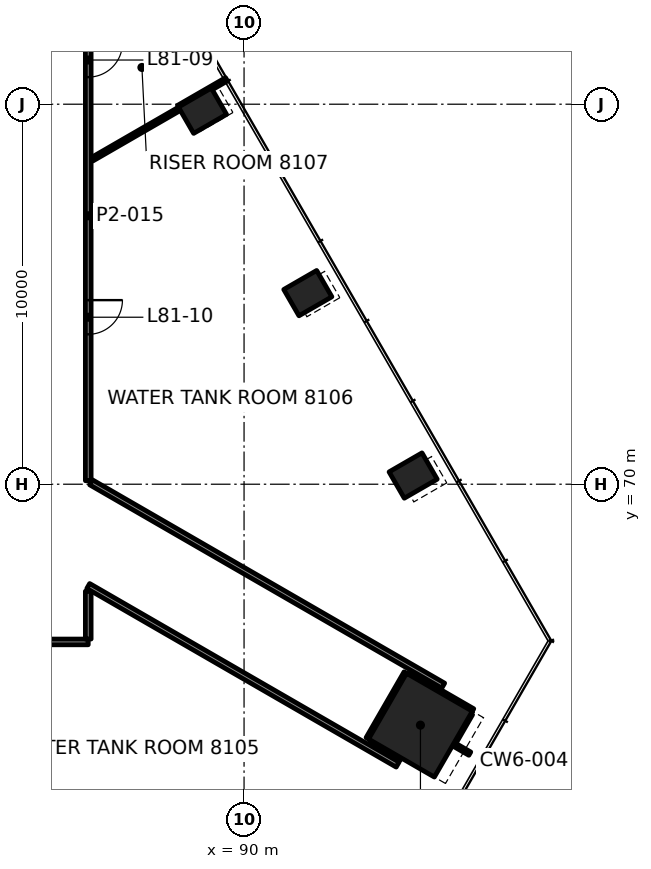
"""IFC4 building model, lengths in metres.
Left out: names, types, materials, properties, quantities, classifications, styles, units other than length and angle.
Written with IfcOpenShell. Run it as: python <this file> out.ifc"""

import sys

from ifc_helpers import new_model, si_unit, direction, frame, frame_2d, origin, origin_2d, place, context, subcontext, project, spatial, rectangle, hollow_rectangle, extrude, element, fill, save


model = new_model("IFC4")
c1 = context("Model", 3, precision=1e-05, world=origin(), true_north=direction((0.0, 1.0)))
c2 = subcontext(c1, "Body", "Model", "MODEL_VIEW")
j1 = project(units=[si_unit("LENGTHUNIT", "METRE"), si_unit("PLANEANGLEUNIT", "RADIAN")], contexts=[c1])
p1 = place(None, origin())
s1 = spatial("IfcSite", under=j1, at=p1, CompositionType="ELEMENT")
p2 = place(p1, origin())
s2 = spatial("IfcBuilding", under=s1, at=p2, CompositionType="ELEMENT")
p3 = place(p2, frame((0.0, 0.0, 331.6)))
s3 = spatial("IfcBuildingStorey", under=s2, at=p3, CompositionType="ELEMENT", Elevation=331.6)
p4 = place(p3, frame((94.641, 63.66, 0.0), z_axis=(0.0, 0.0, 1.0), x_axis=(0.5, 0.866025403784, 0.0)))
e1 = element("IfcColumn", 1, at=p4, inside=s3, PredefinedType="COLUMN", context=c2, shape_type="SweptSolid", body=[
    extrude(rectangle(XDim=2.0, YDim=2.0, at=origin_2d()), origin(), (0.0, 0.0, 1.0), 4.0),
])
for number, where, z_axis, x_axis in (
    (2, (94.449, 70.228, -0.0), (0.0, 0.0, 1.0), (-0.5, 0.866, 0.0)),
    (3, (91.678, 75.028, -0.0), (0.0, 0.0, 1.0), (-0.5, 0.866, 0.0)),
    (4, (88.906, 79.829, -0.0), (0.0, 0.0, 1.0), (-0.5, 0.866, 0.0)),
):
    element("IfcColumn", number, at=place(p3, frame(where, z_axis=z_axis, x_axis=x_axis)), inside=s3, PredefinedType="COLUMN", context=c2, shape_type="SweptSolid", body=[
        extrude(hollow_rectangle(XDim=0.8, YDim=1.0, WallThickness=0.05, at=origin_2d()), origin(), (0.0, 0.0, 1.0), 4.0),
    ])
p5 = place(p3, frame((85.899, 65.85, 0.0), z_axis=(0.0, 0.0, 1.0), x_axis=(-1.0, 0.0, 0.0)))
e5 = element("IfcWall", 5, at=p5, inside=s3, PredefinedType="PARTITIONING", context=c2, shape_type="SweptSolid", body=[
    extrude(rectangle(XDim=21.799, YDim=0.15, at=frame_2d((10.899, 0.0))), origin(), (0.0, 0.0, 1.0), 3.1),
])
p6 = place(p5, frame((1.464, 0.0, 0.0)))
e6 = element("IfcOpeningElement", 6, at=p6, cuts=e5, PredefinedType="OPENING", context=c2, shape_type="SweptSolid", body=[
    extrude(rectangle(XDim=0.9, YDim=2.1, at=frame_2d((0.45, 1.05))), frame((0.0, 0.085, 0.0), z_axis=(0.0, -1.0, 0.0), x_axis=(1.0, 0.0, 0.0)), (0.0, 0.0, 1.0), 0.17),
])
p7 = place(p5, frame((10.449, 0.0, 0.0)))
e7 = element("IfcOpeningElement", 7, at=p7, cuts=e5, PredefinedType="OPENING", context=c2, shape_type="SweptSolid", body=[
    extrude(rectangle(XDim=0.9, YDim=2.1, at=frame_2d((0.45, 1.05))), frame((0.0, 0.085, 0.0), z_axis=(0.0, -1.0, 0.0), x_axis=(1.0, 0.0, 0.0)), (0.0, 0.0, 1.0), 0.17),
])
p8 = place(p5, frame((19.435, 0.0, 0.0)))
e8 = element("IfcOpeningElement", 8, at=p8, cuts=e5, PredefinedType="OPENING", context=c2, shape_type="SweptSolid", body=[
    extrude(rectangle(XDim=0.9, YDim=2.1, at=frame_2d((0.45, 1.05))), frame((0.0, 0.085, 0.0), z_axis=(0.0, -1.0, 0.0), x_axis=(1.0, 0.0, 0.0)), (0.0, 0.0, 1.0), 0.17),
])
p9 = place(p3, frame((86.001, 78.551, 0.0), z_axis=(0.0, 0.0, 1.0), x_axis=(0.86602171968, 0.500006381002, 0.0)))
e9 = element("IfcWall", 9, at=p9, inside=s3, PredefinedType="PARTITIONING", context=c2, shape_type="SweptSolid", body=[
    extrude(rectangle(XDim=2.655, YDim=0.1, at=frame_2d((1.327, 0.0))), origin(), (0.0, 0.0, 1.0), 3.1),
])
p10 = place(p3, frame((88.273, 79.925, 0.0), z_axis=(0.0, 0.0, 1.0), x_axis=(0.866032430508, 0.49998782916, 0.0)))
e10 = element("IfcWall", 10, at=p10, inside=s3, PredefinedType="PARTITIONING", context=c2, shape_type="SweptSolid", body=[
    extrude(rectangle(XDim=1.46, YDim=0.1, at=frame_2d((0.73, 0.0))), origin(), (0.0, 0.0, 1.0), 3.088),
])
p11 = place(p3, frame((95.508, 63.16, 0.0), z_axis=(0.0, 0.0, 1.0), x_axis=(0.499859604386, 0.866106446058, 0.0)))
e11 = element("IfcWall", 11, at=p11, inside=s3, PredefinedType="PARTITIONING", context=c2, shape_type="SweptSolid", body=[
    extrude(rectangle(XDim=0.925, YDim=0.1, at=frame_2d((0.462, 0.0))), origin(), (0.0, 0.0, 1.0), 3.1),
])
p12 = place(p3, frame((93.276, 63.294, 0.0), z_axis=(0.0, 0.0, 1.0), x_axis=(0.499909240568, 0.866077797426, 0.0)))
e12 = element("IfcWall", 12, at=p12, inside=s3, PredefinedType="PARTITIONING", context=c2, shape_type="SweptSolid", body=[
    extrude(rectangle(XDim=1.999, YDim=0.15, at=frame_2d((1.0, 0.0))), origin(), (0.0, 0.0, 1.0), 3.097),
])
p13 = place(p3, frame((85.9, 65.926, 0.0), z_axis=(0.0, 0.0, 1.0), x_axis=(0.0, 1.0, 0.0)))
e13 = element("IfcWall", 13, at=p13, inside=s3, PredefinedType="PARTITIONING", context=c2, shape_type="SweptSolid", body=[
    extrude(rectangle(XDim=1.259, YDim=0.15, at=frame_2d((0.629, 0.0))), origin(), (0.0, 0.0, 1.0), 3.097),
])
p14 = place(p3, frame((85.9, 84.036, 0.0), z_axis=(0.0, 0.0, 1.0), x_axis=(0.0, -1.0, 0.0)))
e14 = element("IfcWall", 14, at=p14, inside=s3, PredefinedType="PARTITIONING", context=c2, shape_type="SweptSolid", body=[
    extrude(rectangle(XDim=13.943, YDim=0.15, at=frame_2d((6.972, 0.0))), origin(), (0.0, 0.0, 1.0), 3.1),
])
p15 = place(p14, frame((2.423, 0.0, 0.0)))
e15 = element("IfcOpeningElement", 15, at=p15, cuts=e14, PredefinedType="OPENING", context=c2, shape_type="SweptSolid", body=[
    extrude(rectangle(XDim=0.9, YDim=2.1, at=frame_2d((0.45, 1.05))), frame((0.0, 0.085, 0.0), z_axis=(0.0, -1.0, 0.0), x_axis=(1.0, 0.0, 0.0)), (0.0, 0.0, 1.0), 0.17),
])
p16 = place(p14, frame((9.191, 0.0, 0.0)))
e16 = element("IfcOpeningElement", 16, at=p16, cuts=e14, PredefinedType="OPENING", context=c2, shape_type="SweptSolid", body=[
    extrude(rectangle(XDim=0.9, YDim=2.1, at=frame_2d((0.45, 1.05))), frame((0.0, 0.085, 0.0), z_axis=(0.0, -1.0, 0.0), x_axis=(1.0, 0.0, 0.0)), (0.0, 0.0, 1.0), 0.17),
])
p17 = place(p3, frame((95.241, 64.7, 0.0), z_axis=(0.0, 0.0, 1.0), x_axis=(-0.866021425885, 0.500006889861, 0.0)))
e17 = element("IfcWall", 17, at=p17, inside=s3, PredefinedType="PARTITIONING", context=c2, shape_type="SweptSolid", body=[
    extrude(rectangle(XDim=10.699, YDim=0.15, at=frame_2d((5.35, 0.0))), origin(), (0.0, 0.0, 1.0), 3.1),
])
p18 = place(p3, frame((96.007, 64.027, 0.0), z_axis=(0.0, 0.0, 1.0), x_axis=(-0.866048237946, 0.499960447986, 0.0)))
e18 = element("IfcWall", 18, at=p18, inside=s3, PredefinedType="PARTITIONING", context=c2, shape_type="SweptSolid", body=[
    extrude(rectangle(XDim=1.924, YDim=0.15, at=frame_2d((0.962, 0.0))), origin(), (0.0, 0.0, 1.0), 3.1),
])
p19 = place(p3, frame((95.94, 62.91, 0.0), z_axis=(0.0, 0.0, 1.0), x_axis=(-0.865945212559, 0.500138869561, 0.0)))
e19 = element("IfcWall", 19, at=p19, inside=s3, PredefinedType="PARTITIONING", context=c2, shape_type="SweptSolid", body=[
    extrude(rectangle(XDim=0.44, YDim=0.1, at=frame_2d((0.22, 0.0))), origin(), (0.0, 0.0, 1.0), 3.1),
])
p20 = place(p3, frame((94.141, 62.794, 0.0), z_axis=(0.0, 0.0, 1.0), x_axis=(-0.865974401185, 0.500088328689, 0.0)))
e20 = element("IfcWall", 20, at=p20, inside=s3, PredefinedType="PARTITIONING", context=c2, shape_type="SweptSolid", body=[
    extrude(rectangle(XDim=0.924, YDim=0.15, at=frame_2d((0.462, 0.0))), origin(), (0.0, 0.0, 1.0), 3.1),
])
p21 = place(p3, frame((94.041, 62.621, 0.0), z_axis=(0.0, 0.0, 1.0), x_axis=(-0.866027286158, 0.499996739618, 0.0)))
e21 = element("IfcWall", 21, at=p21, inside=s3, PredefinedType="PARTITIONING", context=c2, shape_type="SweptSolid", body=[
    extrude(rectangle(XDim=9.4, YDim=0.15, at=frame_2d((4.7, 0.0))), origin(), (0.0, 0.0, 1.0), 3.097),
])
p22 = place(p15, origin())
e22 = element("IfcDoor", 22, at=p22, inside=s3, OperationType="SINGLE_SWING_LEFT", PredefinedType="DOOR", context=c2, shape_type="SweptSolid", body=[
    extrude(rectangle(XDim=0.9, YDim=2.1, at=frame_2d((0.45, 1.05))), frame((0.0, 0.025, 0.0), z_axis=(0.0, -1.0, 0.0), x_axis=(1.0, 0.0, 0.0)), (0.0, 0.0, 1.0), 0.05),
])
fill(e15, e22)
p23 = place(p16, origin())
e23 = element("IfcDoor", 23, at=p23, inside=s3, OperationType="SINGLE_SWING_RIGHT", PredefinedType="DOOR", context=c2, shape_type="SweptSolid", body=[
    extrude(rectangle(XDim=0.9, YDim=2.1, at=frame_2d((0.45, 1.05))), frame((0.0, 0.025, 0.0), z_axis=(0.0, -1.0, 0.0), x_axis=(1.0, 0.0, 0.0)), (0.0, 0.0, 1.0), 0.05),
])
fill(e16, e23)
save(model, sys.argv[1])
